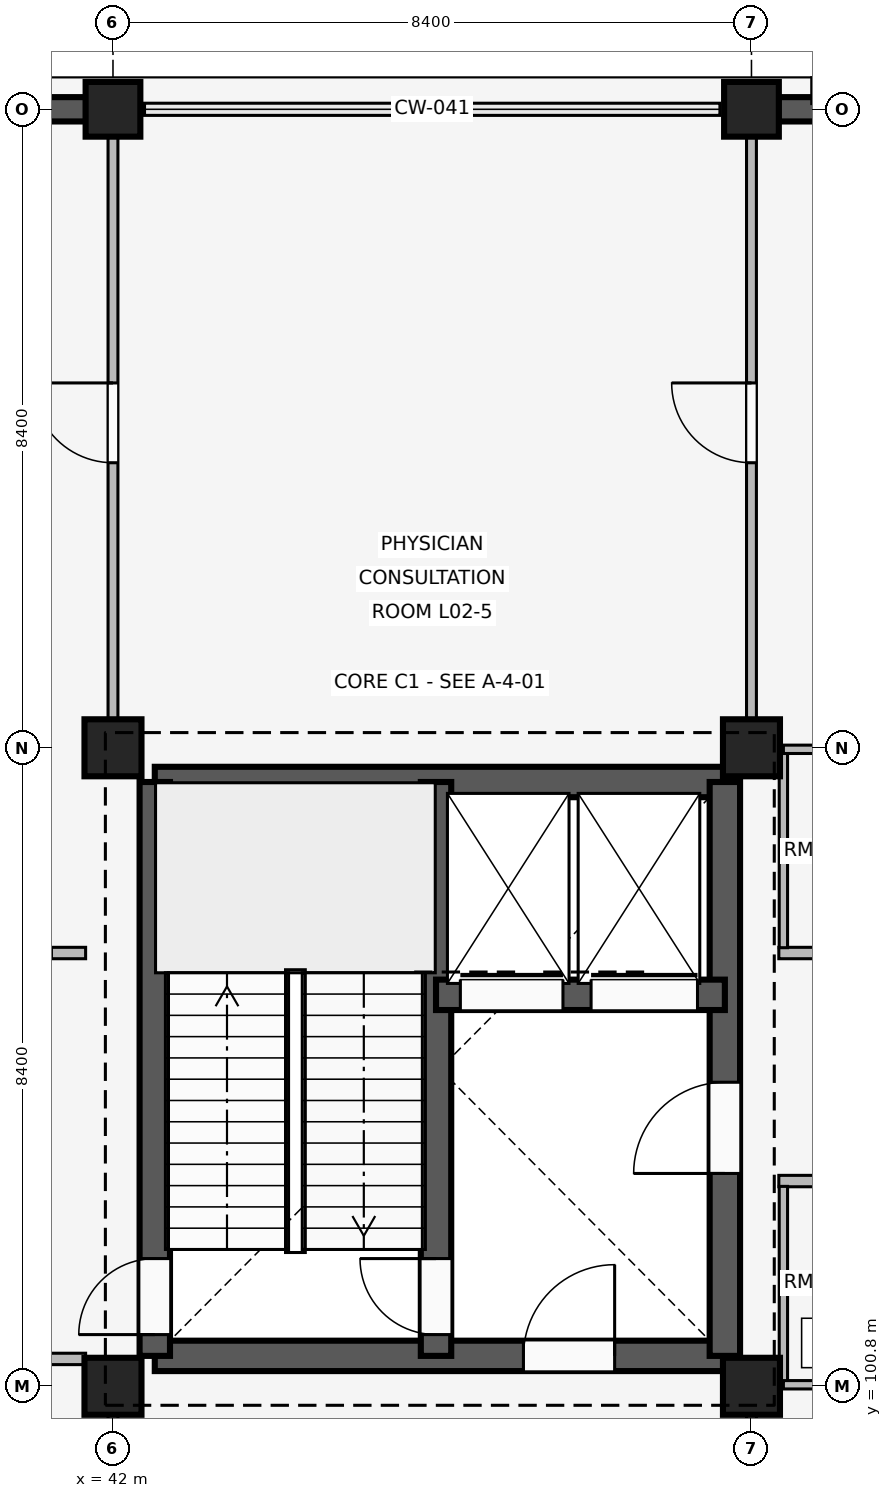
"""IFC4 building model, lengths in metres.
Left out: names, types, materials, properties, quantities, classifications, styles, units other than length and angle.
Written with IfcOpenShell. Run it as: python <this file> out.ifc"""

import sys

from ifc_helpers import new_model, si_unit, direction, frame, frame_2d, origin, origin_2d, place, context, subcontext, project, spatial, rectangle, extrude, element, fill, save


model = new_model("IFC4")
c1 = context("Model", 3, precision=1e-05, world=origin(), true_north=direction((0.0, 1.0)))
c2 = subcontext(c1, "Body", "Model", "MODEL_VIEW")
j1 = project(units=[si_unit("LENGTHUNIT", "METRE"), si_unit("PLANEANGLEUNIT", "RADIAN")], contexts=[c1])
p1 = place(None, origin())
s1 = spatial("IfcSite", under=j1, at=p1, CompositionType="ELEMENT")
p2 = place(p1, origin())
s2 = spatial("IfcBuilding", under=s1, at=p2, CompositionType="ELEMENT")
p3 = place(p2, frame((0.0, 0.0, 8.1)))
s3 = spatial("IfcBuildingStorey", under=s2, at=p3, CompositionType="ELEMENT", Elevation=8.1)
for number, where, z_axis, x_axis in (
    (1, (42.0, 100.8, 0.0), (0.0, 0.0, 1.0), (1.0, 0.0, 0.0)),
    (2, (42.0, 109.2, 0.0), (0.0, 0.0, 1.0), (1.0, 0.0, 0.0)),
):
    element("IfcColumn", number, at=place(p3, frame(where, z_axis=z_axis, x_axis=x_axis)), inside=s3, PredefinedType="COLUMN", context=c2, shape_type="SweptSolid", body=[
        extrude(rectangle(XDim=0.75, YDim=0.75, at=origin_2d()), origin(), (0.0, 0.0, 1.0), 4.8),
    ])
p4 = place(p3, frame((42.0, 117.6, 0.0), z_axis=(0.0, 0.0, 1.0), x_axis=(1.0, 0.0, 0.0)))
e3 = element("IfcColumn", 3, at=p4, inside=s3, PredefinedType="COLUMN", context=c2, shape_type="SweptSolid", body=[
    extrude(rectangle(XDim=0.72, YDim=0.72, at=origin_2d()), origin(), (0.0, 0.0, 1.0), 4.8),
])
for number, where, z_axis, x_axis in (
    (4, (50.4, 100.8, 0.0), (0.0, 0.0, 1.0), (1.0, 0.0, 0.0)),
    (5, (50.4, 109.2, 0.0), (0.0, 0.0, 1.0), (1.0, 0.0, 0.0)),
):
    element("IfcColumn", number, at=place(p3, frame(where, z_axis=z_axis, x_axis=x_axis)), inside=s3, PredefinedType="COLUMN", context=c2, shape_type="SweptSolid", body=[
        extrude(rectangle(XDim=0.75, YDim=0.75, at=origin_2d()), origin(), (0.0, 0.0, 1.0), 4.8),
    ])
p5 = place(p3, frame((50.4, 117.6, 0.0), z_axis=(0.0, 0.0, 1.0), x_axis=(1.0, 0.0, 0.0)))
e6 = element("IfcColumn", 6, at=p5, inside=s3, PredefinedType="COLUMN", context=c2, shape_type="SweptSolid", body=[
    extrude(rectangle(XDim=0.72, YDim=0.72, at=origin_2d()), origin(), (0.0, 0.0, 1.0), 4.8),
])
p6 = place(p3, frame((33.955, 117.6, 0.0), z_axis=(0.0, 0.0, 1.0), x_axis=(1.0, 0.0, 0.0)))
e7 = element("IfcWall", 7, at=p6, inside=s3, PredefinedType="SOLIDWALL", context=c2, shape_type="SweptSolid", body=[
    extrude(rectangle(XDim=7.69, YDim=0.32, at=frame_2d((3.845, 0.0))), origin(), (0.0, 0.0, 1.0), 3.86),
])
p7 = place(p6, frame((1.019, 0.0, 0.85)))
e8 = element("IfcOpeningElement", 8, at=p7, cuts=e7, PredefinedType="OPENING", context=c2, shape_type="SweptSolid", body=[
    extrude(rectangle(XDim=1.5, YDim=1.55, at=frame_2d((0.75, 0.775))), frame((0.0, 0.17, 0.0), z_axis=(0.0, -1.0, 0.0), x_axis=(1.0, 0.0, 0.0)), (0.0, 0.0, 1.0), 0.34),
])
p8 = place(p6, frame((5.171, 0.0, 0.85)))
e9 = element("IfcOpeningElement", 9, at=p8, cuts=e7, PredefinedType="OPENING", context=c2, shape_type="SweptSolid", body=[
    extrude(rectangle(XDim=1.5, YDim=1.55, at=frame_2d((0.75, 0.775))), frame((0.0, 0.17, 0.0), z_axis=(0.0, -1.0, 0.0), x_axis=(1.0, 0.0, 0.0)), (0.0, 0.0, 1.0), 0.34),
])
p9 = place(p3, frame((50.755, 117.6, 0.0), z_axis=(0.0, 0.0, 1.0), x_axis=(1.0, 0.0, 0.0)))
e10 = element("IfcWall", 10, at=p9, inside=s3, PredefinedType="SOLIDWALL", context=c2, shape_type="SweptSolid", body=[
    extrude(rectangle(XDim=7.69, YDim=0.32, at=frame_2d((3.845, 0.0))), origin(), (0.0, 0.0, 1.0), 3.86),
])
p10 = place(p9, frame((1.129, 0.0, 0.85)))
e11 = element("IfcOpeningElement", 11, at=p10, cuts=e10, PredefinedType="OPENING", context=c2, shape_type="SweptSolid", body=[
    extrude(rectangle(XDim=1.28, YDim=1.38, at=frame_2d((0.64, 0.69))), frame((0.0, 0.17, 0.0), z_axis=(0.0, -1.0, 0.0), x_axis=(1.0, 0.0, 0.0)), (0.0, 0.0, 1.0), 0.34),
])
p11 = place(p9, frame((5.281, 0.0, 0.85)))
e12 = element("IfcOpeningElement", 12, at=p11, cuts=e10, PredefinedType="OPENING", context=c2, shape_type="SweptSolid", body=[
    extrude(rectangle(XDim=1.28, YDim=1.38, at=frame_2d((0.64, 0.69))), frame((0.0, 0.17, 0.0), z_axis=(0.0, -1.0, 0.0), x_axis=(1.0, 0.0, 0.0)), (0.0, 0.0, 1.0), 0.34),
])
p12 = place(p3, frame((51.293, 117.675, 0.0), z_axis=(0.0, 0.0, 1.0), x_axis=(0.0, 1.0, 0.0)))
e13 = element("IfcWall", 13, at=p12, inside=s3, PredefinedType="ELEMENTEDWALL", context=c2, shape_type="SweptSolid", body=[
    extrude(rectangle(XDim=0.34, YDim=0.2, at=frame_2d((0.17, 0.0))), origin(), (0.0, 0.0, 1.0), 3.84),
])
p13 = place(p3, frame((42.55, 101.2, 0.0), z_axis=(0.0, 0.0, 1.0), x_axis=(1.0, 0.0, 0.0)))
e14 = element("IfcWall", 14, at=p13, inside=s3, PredefinedType="SHEAR", context=c2, shape_type="SweptSolid", body=[
    extrude(rectangle(XDim=7.5, YDim=0.4, at=frame_2d((3.75, 0.0))), origin(), (0.0, 0.0, 1.0), 4.52),
])
p14 = place(p13, frame((4.85, 0.0, 0.0)))
e15 = element("IfcOpeningElement", 15, at=p14, cuts=e14, PredefinedType="OPENING", context=c2, shape_type="SweptSolid", body=[
    extrude(rectangle(XDim=1.2, YDim=2.2, at=frame_2d((0.6, 1.1))), frame((0.0, 0.21, 0.0), z_axis=(0.0, -1.0, 0.0), x_axis=(1.0, 0.0, 0.0)), (0.0, 0.0, 1.0), 0.42),
])
p15 = place(p3, frame((42.55, 108.75, 0.0), z_axis=(0.0, 0.0, 1.0), x_axis=(1.0, 0.0, 0.0)))
e16 = element("IfcWall", 16, at=p15, inside=s3, PredefinedType="SHEAR", context=c2, shape_type="SweptSolid", body=[
    extrude(rectangle(XDim=7.5, YDim=0.4, at=frame_2d((3.75, 0.0))), origin(), (0.0, 0.0, 1.0), 4.52),
])
p16 = place(p3, frame((42.55, 101.2, 0.0), z_axis=(0.0, 0.0, 1.0), x_axis=(0.0, 1.0, 0.0)))
e17 = element("IfcWall", 17, at=p16, inside=s3, PredefinedType="SHEAR", context=c2, shape_type="SweptSolid", body=[
    extrude(rectangle(XDim=7.55, YDim=0.4, at=frame_2d((3.775, 0.0))), origin(), (0.0, 0.0, 1.0), 4.52),
])
p17 = place(p16, frame((0.28, 0.0, 0.0)))
e18 = element("IfcOpeningElement", 18, at=p17, cuts=e17, PredefinedType="OPENING", context=c2, shape_type="SweptSolid", body=[
    extrude(rectangle(XDim=1.0, YDim=2.15, at=frame_2d((0.5, 1.075))), frame((0.0, 0.21, 0.0), z_axis=(0.0, -1.0, 0.0), x_axis=(1.0, 0.0, 0.0)), (0.0, 0.0, 1.0), 0.42),
])
p18 = place(p3, frame((50.05, 101.2, 0.0), z_axis=(0.0, 0.0, 1.0), x_axis=(0.0, 1.0, 0.0)))
e19 = element("IfcWall", 19, at=p18, inside=s3, PredefinedType="SHEAR", context=c2, shape_type="SweptSolid", body=[
    extrude(rectangle(XDim=7.55, YDim=0.4, at=frame_2d((3.775, 0.0))), origin(), (0.0, 0.0, 1.0), 4.52),
])
p19 = place(p18, frame((2.4, 0.0, 0.0)))
e20 = element("IfcOpeningElement", 20, at=p19, cuts=e19, PredefinedType="OPENING", context=c2, shape_type="SweptSolid", body=[
    extrude(rectangle(XDim=1.2, YDim=2.2, at=frame_2d((0.6, 1.1))), frame((0.0, 0.21, 0.0), z_axis=(0.0, -1.0, 0.0), x_axis=(1.0, 0.0, 0.0)), (0.0, 0.0, 1.0), 0.42),
])
p20 = place(p3, frame((46.25, 101.2, 0.0), z_axis=(0.0, 0.0, 1.0), x_axis=(0.0, 1.0, 0.0)))
e21 = element("IfcWall", 21, at=p20, inside=s3, PredefinedType="SHEAR", context=c2, shape_type="SweptSolid", body=[
    extrude(rectangle(XDim=7.55, YDim=0.4, at=frame_2d((3.775, 0.0))), origin(), (0.0, 0.0, 1.0), 4.52),
])
p21 = place(p20, frame((0.28, 0.0, 0.0)))
e22 = element("IfcOpeningElement", 22, at=p21, cuts=e21, PredefinedType="OPENING", context=c2, shape_type="SweptSolid", body=[
    extrude(rectangle(XDim=1.0, YDim=2.15, at=frame_2d((0.5, 1.075))), frame((0.0, 0.21, 0.0), z_axis=(0.0, -1.0, 0.0), x_axis=(1.0, 0.0, 0.0)), (0.0, 0.0, 1.0), 0.42),
])
p22 = place(p3, frame((46.25, 105.95, 0.0), z_axis=(0.0, 0.0, 1.0), x_axis=(1.0, 0.0, 0.0)))
e23 = element("IfcWall", 23, at=p22, inside=s3, PredefinedType="SHEAR", context=c2, shape_type="SweptSolid", body=[
    extrude(rectangle(XDim=3.8, YDim=0.4, at=frame_2d((1.9, 0.0))), origin(), (0.0, 0.0, 1.0), 4.52),
])
p23 = place(p22, frame((0.32, 0.0, 0.0)))
e24 = element("IfcOpeningElement", 24, at=p23, cuts=e23, PredefinedType="OPENING", context=c2, shape_type="SweptSolid", body=[
    extrude(rectangle(XDim=1.35, YDim=2.25, at=frame_2d((0.675, 1.125))), frame((0.0, 0.21, 0.0), z_axis=(0.0, -1.0, 0.0), x_axis=(1.0, 0.0, 0.0)), (0.0, 0.0, 1.0), 0.42),
])
p24 = place(p22, frame((2.04, 0.0, 0.0)))
e25 = element("IfcOpeningElement", 25, at=p24, cuts=e23, PredefinedType="OPENING", context=c2, shape_type="SweptSolid", body=[
    extrude(rectangle(XDim=1.4, YDim=2.25, at=frame_2d((0.7, 1.125))), frame((0.0, 0.21, 0.0), z_axis=(0.0, -1.0, 0.0), x_axis=(1.0, 0.0, 0.0)), (0.0, 0.0, 1.0), 0.42),
])
p25 = place(p3, frame((39.46, 101.16, 0.0), z_axis=(0.0, 0.0, 1.0), x_axis=(1.0, 0.0, 0.0)))
e26 = element("IfcWall", 26, at=p25, inside=s3, PredefinedType="PARTITIONING", context=c2, shape_type="SweptSolid", body=[
    extrude(rectangle(XDim=2.18, YDim=0.15, at=frame_2d((1.09, 0.0))), origin(), (0.0, 0.0, 1.0), 3.84),
])
p26 = place(p25, frame((0.5, 0.0, 0.0)))
e27 = element("IfcOpeningElement", 27, at=p26, cuts=e26, PredefinedType="OPENING", context=c2, shape_type="SweptSolid", body=[
    extrude(rectangle(XDim=1.08, YDim=2.15, at=frame_2d((0.54, 1.075))), frame((0.0, 0.085, 0.0), z_axis=(0.0, -1.0, 0.0), x_axis=(1.0, 0.0, 0.0)), (0.0, 0.0, 1.0), 0.17),
])
p27 = place(p3, frame((41.64, 106.5, 0.0), z_axis=(0.0, 0.0, 1.0), x_axis=(-1.0, 0.0, 0.0)))
e28 = element("IfcWall", 28, at=p27, inside=s3, PredefinedType="PARTITIONING", context=c2, shape_type="SweptSolid", body=[
    extrude(rectangle(XDim=7.96, YDim=0.15, at=frame_2d((3.98, 0.0))), origin(), (0.0, 0.0, 1.0), 3.84),
])
p28 = place(p27, frame((0.45, 0.0, 0.0)))
e29 = element("IfcOpeningElement", 29, at=p28, cuts=e28, PredefinedType="OPENING", context=c2, shape_type="SweptSolid", body=[
    extrude(rectangle(XDim=1.3, YDim=2.25, at=frame_2d((0.65, 1.125))), frame((0.0, 0.085, 0.0), z_axis=(0.0, -1.0, 0.0), x_axis=(1.0, 0.0, 0.0)), (0.0, 0.0, 1.0), 0.17),
])
p29 = place(p27, frame((4.15, 0.0, 0.0)))
e30 = element("IfcOpeningElement", 30, at=p29, cuts=e28, PredefinedType="OPENING", context=c2, shape_type="SweptSolid", body=[
    extrude(rectangle(XDim=1.3, YDim=2.25, at=frame_2d((0.65, 1.125))), frame((0.0, 0.085, 0.0), z_axis=(0.0, -1.0, 0.0), x_axis=(1.0, 0.0, 0.0)), (0.0, 0.0, 1.0), 0.17),
])
p30 = place(p3, frame((42.0, 92.54, 0.0), z_axis=(0.0, 0.0, 1.0), x_axis=(0.0, 1.0, 0.0)))
e31 = element("IfcWall", 31, at=p30, inside=s3, PredefinedType="PARTITIONING", context=c2, shape_type="SweptSolid", body=[
    extrude(rectangle(XDim=8.21, YDim=0.13, at=frame_2d((4.105, 0.0))), origin(), (0.0, 0.0, 1.0), 3.84),
])
p31 = place(p30, frame((3.64, 0.0, 0.0)))
e32 = element("IfcOpeningElement", 32, at=p31, cuts=e31, PredefinedType="OPENING", context=c2, shape_type="SweptSolid", body=[
    extrude(rectangle(XDim=1.08, YDim=2.15, at=frame_2d((0.54, 1.075))), frame((0.0, 0.075, 0.0), z_axis=(0.0, -1.0, 0.0), x_axis=(1.0, 0.0, 0.0)), (0.0, 0.0, 1.0), 0.15),
])
p32 = place(p3, frame((42.0, 109.55, 0.0), z_axis=(0.0, 0.0, 1.0), x_axis=(0.0, 1.0, 0.0)))
e33 = element("IfcWall", 33, at=p32, inside=s3, PredefinedType="PARTITIONING", context=c2, shape_type="SweptSolid", body=[
    extrude(rectangle(XDim=7.91, YDim=0.13, at=frame_2d((3.955, 0.0))), origin(), (0.0, 0.0, 1.0), 3.84),
])
p33 = place(p32, frame((3.4, 0.0, 0.0)))
e34 = element("IfcOpeningElement", 34, at=p33, cuts=e33, PredefinedType="OPENING", context=c2, shape_type="SweptSolid", body=[
    extrude(rectangle(XDim=1.05, YDim=2.2, at=frame_2d((0.525, 1.1))), frame((0.0, 0.075, 0.0), z_axis=(0.0, -1.0, 0.0), x_axis=(1.0, 0.0, 0.0)), (0.0, 0.0, 1.0), 0.15),
])
p34 = place(p3, frame((50.4, 92.54, 0.0), z_axis=(0.0, 0.0, 1.0), x_axis=(0.0, 1.0, 0.0)))
e35 = element("IfcWall", 35, at=p34, inside=s3, PredefinedType="PARTITIONING", context=c2, shape_type="SweptSolid", body=[
    extrude(rectangle(XDim=8.21, YDim=0.13, at=frame_2d((4.105, 0.0))), origin(), (0.0, 0.0, 1.0), 3.84),
])
p35 = place(p34, frame((3.64, 0.0, 0.0)))
e36 = element("IfcOpeningElement", 36, at=p35, cuts=e35, PredefinedType="OPENING", context=c2, shape_type="SweptSolid", body=[
    extrude(rectangle(XDim=1.08, YDim=2.15, at=frame_2d((0.54, 1.075))), frame((0.0, 0.075, 0.0), z_axis=(0.0, -1.0, 0.0), x_axis=(1.0, 0.0, 0.0)), (0.0, 0.0, 1.0), 0.15),
])
p36 = place(p3, frame((50.4, 109.55, 0.0), z_axis=(0.0, 0.0, 1.0), x_axis=(0.0, 1.0, 0.0)))
e37 = element("IfcWall", 37, at=p36, inside=s3, PredefinedType="PARTITIONING", context=c2, shape_type="SweptSolid", body=[
    extrude(rectangle(XDim=7.91, YDim=0.13, at=frame_2d((3.955, 0.0))), origin(), (0.0, 0.0, 1.0), 3.84),
])
p37 = place(p36, frame((3.4, 0.0, 0.0)))
e38 = element("IfcOpeningElement", 38, at=p37, cuts=e37, PredefinedType="OPENING", context=c2, shape_type="SweptSolid", body=[
    extrude(rectangle(XDim=1.05, YDim=2.2, at=frame_2d((0.525, 1.1))), frame((0.0, 0.075, 0.0), z_axis=(0.0, -1.0, 0.0), x_axis=(1.0, 0.0, 0.0)), (0.0, 0.0, 1.0), 0.15),
])
p38 = place(p3, frame((50.76, 103.5, 0.0), z_axis=(0.0, 0.0, 1.0), x_axis=(1.0, 0.0, 0.0)))
e39 = element("IfcWall", 39, at=p38, inside=s3, PredefinedType="PARTITIONING", context=c2, shape_type="SweptSolid", body=[
    extrude(rectangle(XDim=7.96, YDim=0.15, at=frame_2d((3.98, 0.0))), origin(), (0.0, 0.0, 1.0), 3.84),
])
p39 = place(p38, frame((2.25, 0.0, 0.0)))
e40 = element("IfcOpeningElement", 40, at=p39, cuts=e39, PredefinedType="OPENING", context=c2, shape_type="SweptSolid", body=[
    extrude(rectangle(XDim=1.3, YDim=2.25, at=frame_2d((0.65, 1.125))), frame((0.0, 0.085, 0.0), z_axis=(0.0, -1.0, 0.0), x_axis=(1.0, 0.0, 0.0)), (0.0, 0.0, 1.0), 0.17),
])
p40 = place(p38, frame((5.95, 0.0, 0.0)))
e41 = element("IfcOpeningElement", 41, at=p40, cuts=e39, PredefinedType="OPENING", context=c2, shape_type="SweptSolid", body=[
    extrude(rectangle(XDim=1.3, YDim=2.25, at=frame_2d((0.65, 1.125))), frame((0.0, 0.085, 0.0), z_axis=(0.0, -1.0, 0.0), x_axis=(1.0, 0.0, 0.0)), (0.0, 0.0, 1.0), 0.17),
])
p41 = place(p3, frame((50.82, 100.82, 0.0), z_axis=(0.0, 0.0, 1.0), x_axis=(0.0, 1.0, 0.0)))
e42 = element("IfcWall", 42, at=p41, inside=s3, PredefinedType="PARTITIONING", context=c2, shape_type="SweptSolid", body=[
    extrude(rectangle(XDim=2.61, YDim=0.11, at=frame_2d((1.305, 0.0))), origin(), (0.0, 0.0, 1.0), 3.84),
])
p42 = place(p3, frame((50.82, 100.82, 0.0), z_axis=(0.0, 0.0, 1.0), x_axis=(1.0, 0.0, 0.0)))
e43 = element("IfcWall", 43, at=p42, inside=s3, PredefinedType="PARTITIONING", context=c2, shape_type="SweptSolid", body=[
    extrude(rectangle(XDim=1.98, YDim=0.11, at=frame_2d((0.99, 0.0))), origin(), (0.0, 0.0, 1.0), 3.84),
])
p43 = place(p42, frame((0.54, 0.0, 0.0)))
e44 = element("IfcOpeningElement", 44, at=p43, cuts=e43, PredefinedType="OPENING", context=c2, shape_type="SweptSolid", body=[
    extrude(rectangle(XDim=0.9, YDim=2.1, at=frame_2d((0.45, 1.05))), frame((0.0, 0.065, 0.0), z_axis=(0.0, -1.0, 0.0), x_axis=(1.0, 0.0, 0.0)), (0.0, 0.0, 1.0), 0.13),
])
p44 = place(p3, frame((58.72, 106.5, 0.0), z_axis=(0.0, 0.0, 1.0), x_axis=(-1.0, 0.0, 0.0)))
e45 = element("IfcWall", 45, at=p44, inside=s3, PredefinedType="PARTITIONING", context=c2, shape_type="SweptSolid", body=[
    extrude(rectangle(XDim=7.96, YDim=0.15, at=frame_2d((3.98, 0.0))), origin(), (0.0, 0.0, 1.0), 3.84),
])
p45 = place(p44, frame((0.73, 0.0, 0.0)))
e46 = element("IfcOpeningElement", 46, at=p45, cuts=e45, PredefinedType="OPENING", context=c2, shape_type="SweptSolid", body=[
    extrude(rectangle(XDim=1.3, YDim=2.25, at=frame_2d((0.65, 1.125))), frame((0.0, 0.085, 0.0), z_axis=(0.0, -1.0, 0.0), x_axis=(1.0, 0.0, 0.0)), (0.0, 0.0, 1.0), 0.17),
])
p46 = place(p44, frame((4.43, 0.0, 0.0)))
e47 = element("IfcOpeningElement", 47, at=p46, cuts=e45, PredefinedType="OPENING", context=c2, shape_type="SweptSolid", body=[
    extrude(rectangle(XDim=1.3, YDim=2.25, at=frame_2d((0.65, 1.125))), frame((0.0, 0.085, 0.0), z_axis=(0.0, -1.0, 0.0), x_axis=(1.0, 0.0, 0.0)), (0.0, 0.0, 1.0), 0.17),
])
p47 = place(p3, frame((50.82, 106.57, 0.0), z_axis=(0.0, 0.0, 1.0), x_axis=(0.0, 1.0, 0.0)))
e48 = element("IfcWall", 48, at=p47, inside=s3, PredefinedType="PARTITIONING", context=c2, shape_type="SweptSolid", body=[
    extrude(rectangle(XDim=2.61, YDim=0.11, at=frame_2d((1.305, 0.0))), origin(), (0.0, 0.0, 1.0), 3.84),
])
p48 = place(p3, frame((50.82, 109.18, 0.0), z_axis=(0.0, 0.0, 1.0), x_axis=(1.0, 0.0, 0.0)))
e49 = element("IfcWall", 49, at=p48, inside=s3, PredefinedType="PARTITIONING", context=c2, shape_type="SweptSolid", body=[
    extrude(rectangle(XDim=1.98, YDim=0.11, at=frame_2d((0.99, 0.0))), origin(), (0.0, 0.0, 1.0), 3.84),
])
p49 = place(p48, frame((0.54, 0.0, 0.0)))
e50 = element("IfcOpeningElement", 50, at=p49, cuts=e49, PredefinedType="OPENING", context=c2, shape_type="SweptSolid", body=[
    extrude(rectangle(XDim=0.9, YDim=2.1, at=frame_2d((0.45, 1.05))), frame((0.0, 0.065, 0.0), z_axis=(0.0, -1.0, 0.0), x_axis=(1.0, 0.0, 0.0)), (0.0, 0.0, 1.0), 0.13),
])
p50 = place(p19, origin())
e51 = element("IfcDoor", 51, at=p50, inside=s3, OperationType="SINGLE_SWING_LEFT", PredefinedType="DOOR", context=c2, shape_type="SweptSolid", body=[
    extrude(rectangle(XDim=1.2, YDim=2.2, at=frame_2d((0.6, 1.1))), frame((0.0, 0.025, 0.0), z_axis=(0.0, -1.0, 0.0), x_axis=(1.0, 0.0, 0.0)), (0.0, 0.0, 1.0), 0.05),
])
fill(e20, e51)
p51 = place(p14, origin())
e52 = element("IfcDoor", 52, at=p51, inside=s3, OperationType="SINGLE_SWING_RIGHT", PredefinedType="DOOR", context=c2, shape_type="SweptSolid", body=[
    extrude(rectangle(XDim=1.2, YDim=2.2, at=frame_2d((0.6, 1.1))), frame((0.0, 0.025, 0.0), z_axis=(0.0, -1.0, 0.0), x_axis=(1.0, 0.0, 0.0)), (0.0, 0.0, 1.0), 0.05),
])
fill(e15, e52)
p52 = place(p17, origin())
e53 = element("IfcDoor", 53, at=p52, inside=s3, OperationType="SINGLE_SWING_LEFT", PredefinedType="DOOR", context=c2, shape_type="SweptSolid", body=[
    extrude(rectangle(XDim=1.0, YDim=2.15, at=frame_2d((0.5, 1.075))), frame((0.0, 0.025, 0.0), z_axis=(0.0, -1.0, 0.0), x_axis=(1.0, 0.0, 0.0)), (0.0, 0.0, 1.0), 0.05),
])
fill(e18, e53)
p53 = place(p21, origin())
e54 = element("IfcDoor", 54, at=p53, inside=s3, OperationType="SINGLE_SWING_RIGHT", PredefinedType="DOOR", context=c2, shape_type="SweptSolid", body=[
    extrude(rectangle(XDim=1.0, YDim=2.15, at=frame_2d((0.5, 1.075))), frame((0.0, 0.025, 0.0), z_axis=(0.0, -1.0, 0.0), x_axis=(1.0, 0.0, 0.0)), (0.0, 0.0, 1.0), 0.05),
])
fill(e22, e54)
p54 = place(p23, origin())
e55 = element("IfcDoor", 55, at=p54, inside=s3, OperationType="SLIDING_TO_LEFT", PredefinedType="DOOR", context=c2, shape_type="SweptSolid", body=[
    extrude(rectangle(XDim=1.35, YDim=2.25, at=frame_2d((0.675, 1.125))), frame((0.0, 0.025, 0.0), z_axis=(0.0, -1.0, 0.0), x_axis=(1.0, 0.0, 0.0)), (0.0, 0.0, 1.0), 0.05),
])
fill(e24, e55)
p55 = place(p24, origin())
e56 = element("IfcDoor", 56, at=p55, inside=s3, OperationType="SLIDING_TO_LEFT", PredefinedType="DOOR", context=c2, shape_type="SweptSolid", body=[
    extrude(rectangle(XDim=1.4, YDim=2.25, at=frame_2d((0.7, 1.125))), frame((0.0, 0.025, 0.0), z_axis=(0.0, -1.0, 0.0), x_axis=(1.0, 0.0, 0.0)), (0.0, 0.0, 1.0), 0.05),
])
fill(e25, e56)
p56 = place(p33, origin())
e57 = element("IfcDoor", 57, at=p56, inside=s3, OperationType="SINGLE_SWING_RIGHT", PredefinedType="DOOR", context=c2, shape_type="SweptSolid", body=[
    extrude(rectangle(XDim=1.05, YDim=2.2, at=frame_2d((0.525, 1.1))), frame((0.0, 0.025, 0.0), z_axis=(0.0, -1.0, 0.0), x_axis=(1.0, 0.0, 0.0)), (0.0, 0.0, 1.0), 0.05),
])
fill(e34, e57)
p57 = place(p37, origin())
e58 = element("IfcDoor", 58, at=p57, inside=s3, OperationType="SINGLE_SWING_RIGHT", PredefinedType="DOOR", context=c2, shape_type="SweptSolid", body=[
    extrude(rectangle(XDim=1.05, YDim=2.2, at=frame_2d((0.525, 1.1))), frame((0.0, 0.025, 0.0), z_axis=(0.0, -1.0, 0.0), x_axis=(1.0, 0.0, 0.0)), (0.0, 0.0, 1.0), 0.05),
])
fill(e38, e58)
save(model, sys.argv[1])
